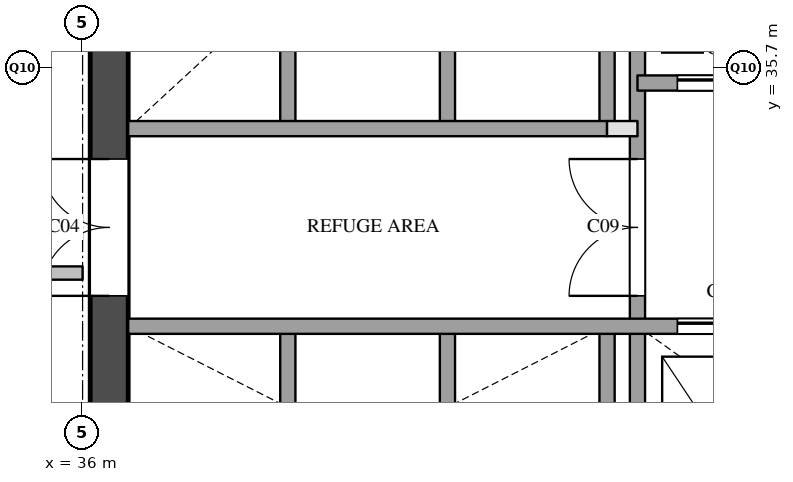
"""IFC4 building model, lengths in metres.
Left out: names, types, materials, properties, quantities, classifications, styles, units other than length and angle.
Written with IfcOpenShell. Run it as: python <this file> out.ifc"""

import sys

from ifc_helpers import new_model, si_unit, direction, frame, frame_2d, origin, place, context, subcontext, project, spatial, rectangle, extrude, element, fill, save


model = new_model("IFC4")
c1 = context("Model", 3, precision=1e-05, world=origin(), true_north=direction((0.0, 1.0)))
c2 = subcontext(c1, "Body", "Model", "MODEL_VIEW")
j1 = project(units=[si_unit("LENGTHUNIT", "METRE"), si_unit("PLANEANGLEUNIT", "RADIAN")], contexts=[c1])
p1 = place(None, origin())
s1 = spatial("IfcSite", under=j1, at=p1, CompositionType="ELEMENT")
p2 = place(p1, origin())
s2 = spatial("IfcBuilding", under=s1, at=p2, CompositionType="ELEMENT")
p3 = place(p2, frame((0.0, 0.0, 197.3)))
s3 = spatial("IfcBuildingStorey", under=s2, at=p3, CompositionType="ELEMENT", Elevation=197.3)
p4 = place(p3, frame((36.35, 29.1, 0.0), z_axis=(0.0, 0.0, 1.0), x_axis=(0.0, 1.0, 0.0)))
e1 = element("IfcWall", 1, at=p4, inside=s3, PredefinedType="SHEAR", context=c2, shape_type="SweptSolid", body=[
    extrude(rectangle(XDim=20.3, YDim=0.5, at=frame_2d((10.15, 0.0))), origin(), (0.0, 0.0, 1.0), 5.7),
])
p5 = place(p4, frame((3.6, 0.0, 0.0)))
e2 = element("IfcOpeningElement", 2, at=p5, cuts=e1, PredefinedType="OPENING", context=c2, shape_type="SweptSolid", body=[
    extrude(rectangle(XDim=1.8, YDim=2.1, at=frame_2d((0.9, 1.05))), frame((0.0, 0.26, 0.0), z_axis=(0.0, -1.0, 0.0), x_axis=(1.0, 0.0, 0.0)), (0.0, 0.0, 1.0), 0.52),
])
p6 = place(p4, frame((16.4, 0.0, 0.0)))
e3 = element("IfcOpeningElement", 3, at=p6, cuts=e1, PredefinedType="OPENING", context=c2, shape_type="SweptSolid", body=[
    extrude(rectangle(XDim=1.0, YDim=2.1, at=frame_2d((0.5, 1.05))), frame((0.0, 0.26, 0.0), z_axis=(0.0, -1.0, 0.0), x_axis=(1.0, 0.0, 0.0)), (0.0, 0.0, 1.0), 0.52),
])
p7 = place(p3, frame((38.7, 29.1, 0.0), z_axis=(0.0, 0.0, 1.0), x_axis=(0.0, 1.0, 0.0)))
e4 = element("IfcWall", 4, at=p7, inside=s3, PredefinedType="SOLIDWALL", context=c2, shape_type="SweptSolid", body=[
    extrude(rectangle(XDim=3.2, YDim=0.2, at=frame_2d((1.6, 0.0))), origin(), (0.0, 0.0, 1.0), 5.7),
])
p8 = place(p3, frame((38.7, 34.9, 0.0), z_axis=(0.0, 0.0, 1.0), x_axis=(0.0, 1.0, 0.0)))
e5 = element("IfcWall", 5, at=p8, inside=s3, PredefinedType="SOLIDWALL", context=c2, shape_type="SweptSolid", body=[
    extrude(rectangle(XDim=3.2, YDim=0.2, at=frame_2d((1.6, 0.0))), origin(), (0.0, 0.0, 1.0), 5.7),
])
p9 = place(p3, frame((40.8, 29.1, 0.0), z_axis=(0.0, 0.0, 1.0), x_axis=(0.0, 1.0, 0.0)))
e6 = element("IfcWall", 6, at=p9, inside=s3, PredefinedType="SOLIDWALL", context=c2, shape_type="SweptSolid", body=[
    extrude(rectangle(XDim=3.2, YDim=0.2, at=frame_2d((1.6, 0.0))), origin(), (0.0, 0.0, 1.0), 5.7),
])
p10 = place(p3, frame((40.8, 34.9, 0.0), z_axis=(0.0, 0.0, 1.0), x_axis=(0.0, 1.0, 0.0)))
e7 = element("IfcWall", 7, at=p10, inside=s3, PredefinedType="SOLIDWALL", context=c2, shape_type="SweptSolid", body=[
    extrude(rectangle(XDim=3.2, YDim=0.2, at=frame_2d((1.6, 0.0))), origin(), (0.0, 0.0, 1.0), 5.7),
])
p11 = place(p3, frame((42.9, 29.1, 0.0), z_axis=(0.0, 0.0, 1.0), x_axis=(0.0, 1.0, 0.0)))
e8 = element("IfcWall", 8, at=p11, inside=s3, PredefinedType="SOLIDWALL", context=c2, shape_type="SweptSolid", body=[
    extrude(rectangle(XDim=3.2, YDim=0.2, at=frame_2d((1.6, 0.0))), origin(), (0.0, 0.0, 1.0), 5.7),
])
p12 = place(p3, frame((42.9, 34.9, 0.0), z_axis=(0.0, 0.0, 1.0), x_axis=(0.0, 1.0, 0.0)))
e9 = element("IfcWall", 9, at=p12, inside=s3, PredefinedType="SOLIDWALL", context=c2, shape_type="SweptSolid", body=[
    extrude(rectangle(XDim=3.2, YDim=0.2, at=frame_2d((1.6, 0.0))), origin(), (0.0, 0.0, 1.0), 5.7),
])
p13 = place(p3, frame((43.3, 29.1, 0.0), z_axis=(0.0, 0.0, 1.0), x_axis=(0.0, 1.0, 0.0)))
e10 = element("IfcWall", 10, at=p13, inside=s3, PredefinedType="SOLIDWALL", context=c2, shape_type="SweptSolid", body=[
    extrude(rectangle(XDim=9.9, YDim=0.2, at=frame_2d((4.95, 0.0))), origin(), (0.0, 0.0, 1.0), 5.7),
])
p14 = place(p13, frame((3.6, 0.0, 0.0)))
e11 = element("IfcOpeningElement", 11, at=p14, cuts=e10, PredefinedType="OPENING", context=c2, shape_type="SweptSolid", body=[
    extrude(rectangle(XDim=1.8, YDim=2.1, at=frame_2d((0.9, 1.05))), frame((0.0, 0.11, 0.0), z_axis=(0.0, -1.0, 0.0), x_axis=(1.0, 0.0, 0.0)), (0.0, 0.0, 1.0), 0.22),
])
p15 = place(p3, frame((36.6, 32.3, 0.0), z_axis=(0.0, 0.0, 1.0), x_axis=(1.0, 0.0, 0.0)))
e12 = element("IfcWall", 12, at=p15, inside=s3, PredefinedType="SOLIDWALL", context=c2, shape_type="SweptSolid", body=[
    extrude(rectangle(XDim=11.2, YDim=0.2, at=frame_2d((5.6, 0.0))), origin(), (0.0, 0.0, 1.0), 5.7),
])
p16 = place(p15, frame((7.225, 0.0, 0.0)))
e13 = element("IfcOpeningElement", 13, at=p16, cuts=e12, PredefinedType="OPENING", context=c2, shape_type="SweptSolid", body=[
    extrude(rectangle(XDim=1.2, YDim=2.1, at=frame_2d((0.6, 1.05))), frame((0.0, 0.11, 0.0), z_axis=(0.0, -1.0, 0.0), x_axis=(1.0, 0.0, 0.0)), (0.0, 0.0, 1.0), 0.22),
])
p17 = place(p15, frame((9.475, 0.0, 0.0)))
e14 = element("IfcOpeningElement", 14, at=p17, cuts=e12, PredefinedType="OPENING", context=c2, shape_type="SweptSolid", body=[
    extrude(rectangle(XDim=1.2, YDim=2.1, at=frame_2d((0.6, 1.05))), frame((0.0, 0.11, 0.0), z_axis=(0.0, -1.0, 0.0), x_axis=(1.0, 0.0, 0.0)), (0.0, 0.0, 1.0), 0.22),
])
p18 = place(p3, frame((42.9, 34.9, 0.0), z_axis=(0.0, 0.0, 1.0), x_axis=(1.0, 0.0, 0.0)))
e15 = element("IfcWall", 15, at=p18, inside=s3, PredefinedType="PARTITIONING", context=c2, shape_type="SweptSolid", body=[
    extrude(rectangle(XDim=0.4, YDim=0.2, at=frame_2d((0.2, 0.0))), origin(), (0.0, 0.0, 1.0), 5.7),
])
p19 = place(p3, frame((36.6, 34.9, 0.0), z_axis=(0.0, 0.0, 1.0), x_axis=(1.0, 0.0, 0.0)))
e16 = element("IfcWall", 16, at=p19, inside=s3, PredefinedType="SOLIDWALL", context=c2, shape_type="SweptSolid", body=[
    extrude(rectangle(XDim=6.3, YDim=0.2, at=frame_2d((3.15, 0.0))), origin(), (0.0, 0.0, 1.0), 5.7),
])
p20 = place(p3, frame((43.3, 35.5, 0.0), z_axis=(0.0, 0.0, 1.0), x_axis=(1.0, 0.0, 0.0)))
e17 = element("IfcWall", 17, at=p20, inside=s3, PredefinedType="SOLIDWALL", context=c2, shape_type="SweptSolid", body=[
    extrude(rectangle(XDim=4.5, YDim=0.2, at=frame_2d((2.25, 0.0))), origin(), (0.0, 0.0, 1.0), 5.7),
])
p21 = place(p20, frame((0.525, 0.0, 0.0)))
e18 = element("IfcOpeningElement", 18, at=p21, cuts=e17, PredefinedType="OPENING", context=c2, shape_type="SweptSolid", body=[
    extrude(rectangle(XDim=1.2, YDim=2.1, at=frame_2d((0.6, 1.05))), frame((0.0, 0.11, 0.0), z_axis=(0.0, -1.0, 0.0), x_axis=(1.0, 0.0, 0.0)), (0.0, 0.0, 1.0), 0.22),
])
p22 = place(p20, frame((3.025, 0.0, 0.0)))
e19 = element("IfcOpeningElement", 19, at=p22, cuts=e17, PredefinedType="OPENING", context=c2, shape_type="SweptSolid", body=[
    extrude(rectangle(XDim=0.7, YDim=2.1, at=frame_2d((0.35, 1.05))), frame((0.0, 0.11, 0.0), z_axis=(0.0, -1.0, 0.0), x_axis=(1.0, 0.0, 0.0)), (0.0, 0.0, 1.0), 0.22),
])
p23 = place(p3, frame((18.0, 33.0, 0.0), z_axis=(0.0, 0.0, 1.0), x_axis=(1.0, 0.0, 0.0)))
e20 = element("IfcWall", 20, at=p23, inside=s3, PredefinedType="PARTITIONING", context=c2, shape_type="SweptSolid", body=[
    extrude(rectangle(XDim=18.0, YDim=0.175, at=frame_2d((9.0, 0.0))), origin(), (0.0, 0.0, 1.0), 5.7),
])
p24 = place(p23, frame((5.5, 0.0, 0.0)))
e21 = element("IfcOpeningElement", 21, at=p24, cuts=e20, PredefinedType="OPENING", context=c2, shape_type="SweptSolid", body=[
    extrude(rectangle(XDim=1.0, YDim=2.1, at=frame_2d((0.5, 1.05))), frame((0.0, 0.097, 0.0), z_axis=(0.0, -1.0, 0.0), x_axis=(1.0, 0.0, 0.0)), (0.0, 0.0, 1.0), 0.195),
])
p25 = place(p23, frame((11.5, 0.0, 0.0)))
e22 = element("IfcOpeningElement", 22, at=p25, cuts=e20, PredefinedType="OPENING", context=c2, shape_type="SweptSolid", body=[
    extrude(rectangle(XDim=1.0, YDim=2.1, at=frame_2d((0.5, 1.05))), frame((0.0, 0.097, 0.0), z_axis=(0.0, -1.0, 0.0), x_axis=(1.0, 0.0, 0.0)), (0.0, 0.0, 1.0), 0.195),
])
p26 = place(p16, origin())
e23 = element("IfcDoor", 23, at=p26, inside=s3, OperationType="SLIDING_TO_LEFT", PredefinedType="DOOR", context=c2, shape_type="SweptSolid", body=[
    extrude(rectangle(XDim=1.2, YDim=2.1, at=frame_2d((0.6, 1.05))), frame((0.0, 0.025, 0.0), z_axis=(0.0, -1.0, 0.0), x_axis=(1.0, 0.0, 0.0)), (0.0, 0.0, 1.0), 0.05),
])
fill(e13, e23)
p27 = place(p21, origin())
e24 = element("IfcDoor", 24, at=p27, inside=s3, OperationType="SLIDING_TO_LEFT", PredefinedType="DOOR", context=c2, shape_type="SweptSolid", body=[
    extrude(rectangle(XDim=1.2, YDim=2.1, at=frame_2d((0.6, 1.05))), frame((0.0, 0.025, 0.0), z_axis=(0.0, -1.0, 0.0), x_axis=(1.0, 0.0, 0.0)), (0.0, 0.0, 1.0), 0.05),
])
fill(e18, e24)
p28 = place(p5, origin())
e25 = element("IfcDoor", 25, at=p28, inside=s3, OperationType="DOUBLE_DOOR_SINGLE_SWING", PredefinedType="DOOR", context=c2, shape_type="SweptSolid", body=[
    extrude(rectangle(XDim=1.8, YDim=2.1, at=frame_2d((0.9, 1.05))), frame((0.0, 0.025, 0.0), z_axis=(0.0, -1.0, 0.0), x_axis=(1.0, 0.0, 0.0)), (0.0, 0.0, 1.0), 0.05),
])
fill(e2, e25)
p29 = place(p14, origin())
e26 = element("IfcDoor", 26, at=p29, inside=s3, OperationType="DOUBLE_DOOR_SINGLE_SWING", PredefinedType="DOOR", context=c2, shape_type="SweptSolid", body=[
    extrude(rectangle(XDim=1.8, YDim=2.1, at=frame_2d((0.9, 1.05))), frame((0.0, 0.025, 0.0), z_axis=(0.0, -1.0, 0.0), x_axis=(1.0, 0.0, 0.0)), (0.0, 0.0, 1.0), 0.05),
])
fill(e11, e26)
save(model, sys.argv[1])
